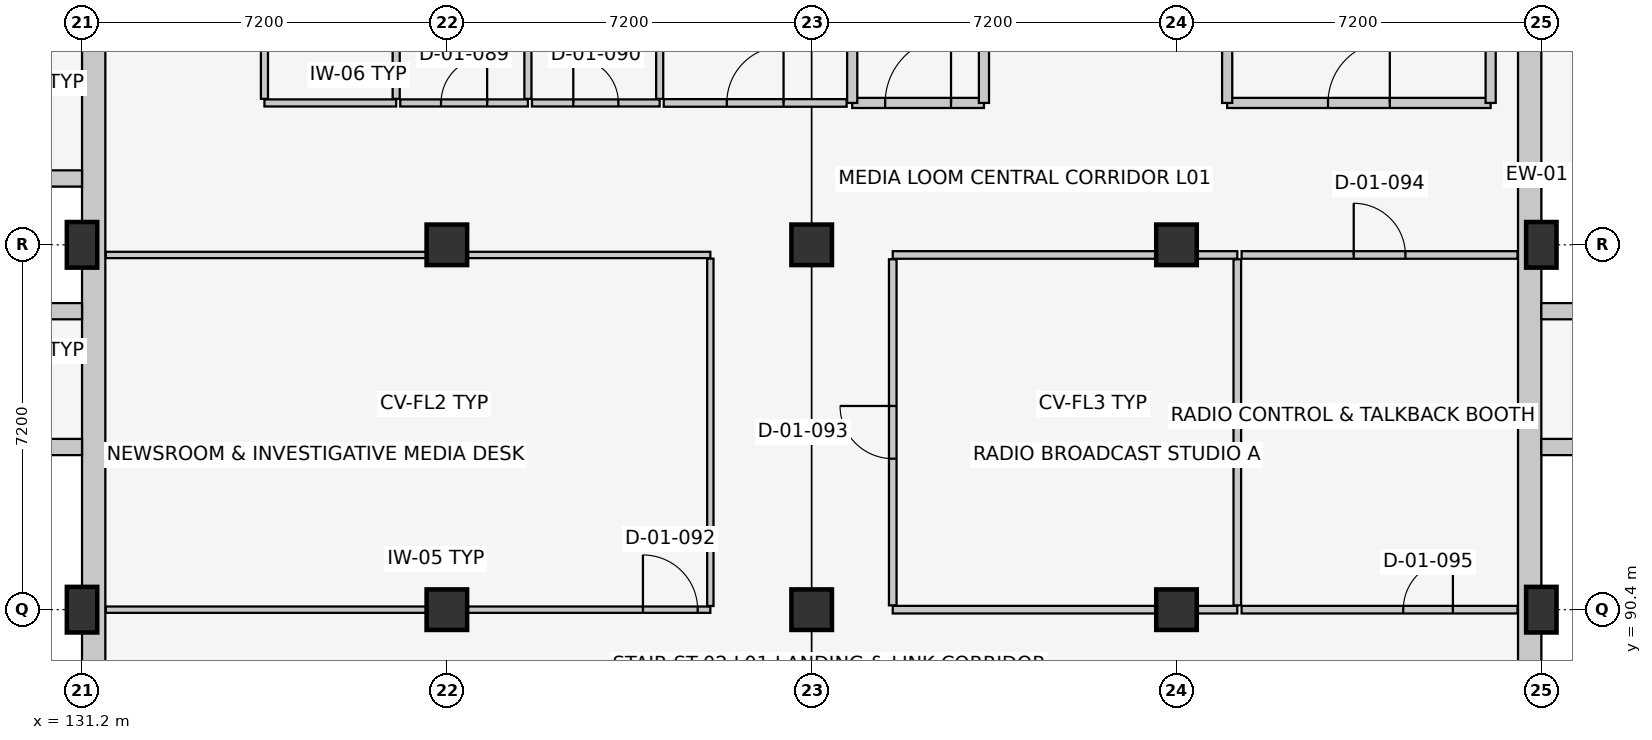
"""IFC4 building model, lengths in metres.
Left out: names, types, materials, properties, quantities, classifications, styles, units other than length and angle.
Written with IfcOpenShell. Run it as: python <this file> out.ifc"""

import sys

from ifc_helpers import new_model, si_unit, direction, frame, frame_2d, origin, origin_2d, place, context, subcontext, project, spatial, rectangle, extrude, element, fill, save


model = new_model("IFC4")
c1 = context("Model", 3, precision=1e-05, world=origin(), true_north=direction((0.0, 1.0)))
c2 = subcontext(c1, "Body", "Model", "MODEL_VIEW")
j1 = project(units=[si_unit("LENGTHUNIT", "METRE"), si_unit("PLANEANGLEUNIT", "RADIAN")], contexts=[c1])
p1 = place(None, origin())
s1 = spatial("IfcSite", under=j1, at=p1, CompositionType="ELEMENT")
p2 = place(p1, origin())
s2 = spatial("IfcBuilding", under=s1, at=p2, CompositionType="ELEMENT")
p3 = place(p2, frame((0.0, 0.0, 5.4)))
s3 = spatial("IfcBuildingStorey", under=s2, at=p3, CompositionType="ELEMENT", Elevation=5.4)
for number, where, z_axis, x_axis in (
    (1, (131.2, 90.4, 0.0), (0.0, 0.0, 1.0), (1.0, 0.0, 0.0)),
    (2, (131.2, 97.6, 0.0), (0.0, 0.0, 1.0), (1.0, 0.0, 0.0)),
):
    element("IfcColumn", number, at=place(p3, frame(where, z_axis=z_axis, x_axis=x_axis)), inside=s3, PredefinedType="COLUMN", context=c2, shape_type="SweptSolid", body=[
        extrude(rectangle(XDim=0.6, YDim=0.9, at=origin_2d()), origin(), (0.0, 0.0, 1.0), 4.2),
    ])
for number, where, z_axis, x_axis in (
    (3, (138.4, 90.4, 0.0), (0.0, 0.0, 1.0), (1.0, 0.0, 0.0)),
    (4, (138.4, 97.6, 0.0), (0.0, 0.0, 1.0), (1.0, 0.0, 0.0)),
    (5, (145.6, 90.4, 0.0), (0.0, 0.0, 1.0), (1.0, 0.0, 0.0)),
    (6, (145.6, 97.6, 0.0), (0.0, 0.0, 1.0), (1.0, 0.0, 0.0)),
    (7, (152.8, 90.4, 0.0), (0.0, 0.0, 1.0), (1.0, 0.0, 0.0)),
    (8, (152.8, 97.6, 0.0), (0.0, 0.0, 1.0), (1.0, 0.0, 0.0)),
):
    element("IfcColumn", number, at=place(p3, frame(where, z_axis=z_axis, x_axis=x_axis)), inside=s3, PredefinedType="COLUMN", context=c2, shape_type="SweptSolid", body=[
        extrude(rectangle(XDim=0.8, YDim=0.8, at=origin_2d()), origin(), (0.0, 0.0, 1.0), 4.2),
    ])
for number, where, z_axis, x_axis in (
    (9, (160.0, 90.4, 0.0), (0.0, 0.0, 1.0), (1.0, 0.0, 0.0)),
    (10, (160.0, 97.6, 0.0), (0.0, 0.0, 1.0), (1.0, 0.0, 0.0)),
):
    element("IfcColumn", number, at=place(p3, frame(where, z_axis=z_axis, x_axis=x_axis)), inside=s3, PredefinedType="COLUMN", context=c2, shape_type="SweptSolid", body=[
        extrude(rectangle(XDim=0.6, YDim=0.9, at=origin_2d()), origin(), (0.0, 0.0, 1.0), 4.2),
    ])
p4 = place(p3, frame((159.77, 112.0, 0.0), z_axis=(0.0, 0.0, 1.0), x_axis=(0.0, -1.0, 0.0)))
e11 = element("IfcWall", 11, at=p4, inside=s3, PredefinedType="SOLIDWALL", context=c2, shape_type="SweptSolid", body=[
    extrude(rectangle(XDim=28.8, YDim=0.46, at=frame_2d((14.4, 0.0))), origin(), (0.0, 0.0, 1.0), 3.205),
])
p5 = place(p3, frame((160.0, 93.61, 0.0), z_axis=(0.0, 0.0, 1.0), x_axis=(1.0, 0.0, 0.0)))
e12 = element("IfcWall", 12, at=p5, inside=s3, PredefinedType="SOLIDWALL", context=c2, shape_type="SweptSolid", body=[
    extrude(rectangle(XDim=1.793, YDim=0.32, at=frame_2d((0.896, 0.0))), origin(), (0.0, 0.0, 1.0), 3.93),
])
for number, where, z_axis, x_axis in (
    (13, (160.0, 96.29, 0.0), (0.0, 0.0, 1.0), (1.0, 0.0, 0.0)),
    (14, (160.0, 98.91, 0.0), (0.0, 0.0, 1.0), (1.0, 0.0, 0.0)),
):
    element("IfcWall", number, at=place(p3, frame(where, z_axis=z_axis, x_axis=x_axis)), inside=s3, PredefinedType="SOLIDWALL", context=c2, shape_type="SweptSolid", body=[
        extrude(rectangle(XDim=1.35, YDim=0.32, at=frame_2d((0.675, 0.0))), origin(), (0.0, 0.0, 1.0), 3.93),
    ])
p6 = place(p3, frame((131.43, 83.2, 0.0), z_axis=(0.0, 0.0, 1.0), x_axis=(0.0, 1.0, 0.0)))
e15 = element("IfcWall", 15, at=p6, inside=s3, PredefinedType="SOLIDWALL", context=c2, shape_type="SweptSolid", body=[
    extrude(rectangle(XDim=28.8, YDim=0.46, at=frame_2d((14.4, 0.0))), origin(), (0.0, 0.0, 1.0), 3.205),
])
p7 = place(p3, frame((131.2, 93.61, 0.0), z_axis=(0.0, 0.0, 1.0), x_axis=(-1.0, 0.0, 0.0)))
e16 = element("IfcWall", 16, at=p7, inside=s3, PredefinedType="SOLIDWALL", context=c2, shape_type="SweptSolid", body=[
    extrude(rectangle(XDim=1.35, YDim=0.32, at=frame_2d((0.675, 0.0))), origin(), (0.0, 0.0, 1.0), 3.93),
])
for number, where, z_axis, x_axis in (
    (17, (131.2, 96.29, 0.0), (0.0, 0.0, 1.0), (-1.0, 0.0, 0.0)),
    (18, (131.2, 98.91, 0.0), (0.0, 0.0, 1.0), (-1.0, 0.0, 0.0)),
):
    element("IfcWall", number, at=place(p3, frame(where, z_axis=z_axis, x_axis=x_axis)), inside=s3, PredefinedType="SOLIDWALL", context=c2, shape_type="SweptSolid", body=[
        extrude(rectangle(XDim=1.793, YDim=0.32, at=frame_2d((0.896, 0.0))), origin(), (0.0, 0.0, 1.0), 3.93),
    ])
p8 = place(p3, frame((146.4, 100.4, 0.0), z_axis=(0.0, 0.0, 1.0), x_axis=(1.0, 0.0, 0.0)))
e19 = element("IfcWall", 19, at=p8, inside=s3, PredefinedType="PARTITIONING", context=c2, shape_type="SweptSolid", body=[
    extrude(rectangle(XDim=2.6, YDim=0.2, at=frame_2d((1.3, 0.0))), origin(), (0.0, 0.0, 1.0), 3.95),
])
p9 = place(p8, frame((0.65, 0.0, 0.0)))
e20 = element("IfcOpeningElement", 20, at=p9, cuts=e19, PredefinedType="OPENING", context=c2, shape_type="SweptSolid", body=[
    extrude(rectangle(XDim=1.3, YDim=2.2, at=frame_2d((0.65, 1.1))), frame((0.0, 0.112, 0.0), z_axis=(0.0, -1.0, 0.0), x_axis=(1.0, 0.0, 0.0)), (0.0, 0.0, 1.0), 0.224),
])
p10 = place(p3, frame((146.4, 106.2, 0.0), z_axis=(0.0, 0.0, 1.0), x_axis=(0.0, -1.0, 0.0)))
e21 = element("IfcWall", 21, at=p10, inside=s3, PredefinedType="PARTITIONING", context=c2, shape_type="SweptSolid", body=[
    extrude(rectangle(XDim=5.8, YDim=0.2, at=frame_2d((2.9, 0.0))), origin(), (0.0, 0.0, 1.0), 3.95),
])
p11 = place(p3, frame((149.0, 100.4, 0.0), z_axis=(0.0, 0.0, 1.0), x_axis=(0.0, 1.0, 0.0)))
e22 = element("IfcWall", 22, at=p11, inside=s3, PredefinedType="PARTITIONING", context=c2, shape_type="SweptSolid", body=[
    extrude(rectangle(XDim=5.8, YDim=0.2, at=frame_2d((2.9, 0.0))), origin(), (0.0, 0.0, 1.0), 3.375),
])
p12 = place(p3, frame((153.8, 100.4, 0.0), z_axis=(0.0, 0.0, 1.0), x_axis=(1.0, 0.0, 0.0)))
e23 = element("IfcWall", 23, at=p12, inside=s3, PredefinedType="PARTITIONING", context=c2, shape_type="SweptSolid", body=[
    extrude(rectangle(XDim=5.2, YDim=0.2, at=frame_2d((2.6, 0.0))), origin(), (0.0, 0.0, 1.0), 3.95),
])
p13 = place(p12, frame((1.99, 0.0, 0.0)))
e24 = element("IfcOpeningElement", 24, at=p13, cuts=e23, PredefinedType="OPENING", context=c2, shape_type="SweptSolid", body=[
    extrude(rectangle(XDim=1.22, YDim=2.2, at=frame_2d((0.61, 1.1))), frame((0.0, 0.112, 0.0), z_axis=(0.0, -1.0, 0.0), x_axis=(1.0, 0.0, 0.0)), (0.0, 0.0, 1.0), 0.224),
])
for number, where, z_axis, x_axis in (
    (25, (153.8, 106.2, 0.0), (0.0, 0.0, 1.0), (0.0, -1.0, 0.0)),
    (26, (159.0, 100.4, 0.0), (0.0, 0.0, 1.0), (0.0, 1.0, 0.0)),
):
    element("IfcWall", number, at=place(p3, frame(where, z_axis=z_axis, x_axis=x_axis)), inside=s3, PredefinedType="PARTITIONING", context=c2, shape_type="SweptSolid", body=[
        extrude(rectangle(XDim=5.8, YDim=0.2, at=frame_2d((2.9, 0.0))), origin(), (0.0, 0.0, 1.0), 3.95),
    ])
p14 = place(p3, frame((134.8, 100.4, 0.0), z_axis=(0.0, 0.0, 1.0), x_axis=(1.0, 0.0, 0.0)))
e27 = element("IfcWall", 27, at=p14, inside=s3, PredefinedType="PARTITIONING", context=c2, shape_type="SweptSolid", body=[
    extrude(rectangle(XDim=2.6, YDim=0.14, at=frame_2d((1.3, 0.0))), origin(), (0.0, 0.0, 1.0), 3.95),
])
p15 = place(p3, frame((134.8, 100.48, 0.0), z_axis=(0.0, 0.0, 1.0), x_axis=(0.0, 1.0, 0.0)))
e28 = element("IfcWall", 28, at=p15, inside=s3, PredefinedType="PARTITIONING", context=c2, shape_type="SweptSolid", body=[
    extrude(rectangle(XDim=4.86, YDim=0.14, at=frame_2d((2.43, 0.0))), origin(), (0.0, 0.0, 1.0), 3.595),
])
p16 = place(p15, frame((1.93, 0.0, 0.0)))
e29 = element("IfcOpeningElement", 29, at=p16, cuts=e28, PredefinedType="OPENING", context=c2, shape_type="SweptSolid", body=[
    extrude(rectangle(XDim=1.0, YDim=2.1, at=frame_2d((0.5, 1.05))), frame((0.0, 0.082, 0.0), z_axis=(0.0, -1.0, 0.0), x_axis=(1.0, 0.0, 0.0)), (0.0, 0.0, 1.0), 0.164),
])
p17 = place(p3, frame((137.4, 100.48, 0.0), z_axis=(0.0, 0.0, 1.0), x_axis=(0.0, 1.0, 0.0)))
e30 = element("IfcWall", 30, at=p17, inside=s3, PredefinedType="PARTITIONING", context=c2, shape_type="SweptSolid", body=[
    extrude(rectangle(XDim=4.86, YDim=0.14, at=frame_2d((2.43, 0.0))), origin(), (0.0, 0.0, 1.0), 3.95),
])
p18 = place(p3, frame((137.48, 100.4, 0.0), z_axis=(0.0, 0.0, 1.0), x_axis=(1.0, 0.0, 0.0)))
e31 = element("IfcWall", 31, at=p18, inside=s3, PredefinedType="PARTITIONING", context=c2, shape_type="SweptSolid", body=[
    extrude(rectangle(XDim=2.52, YDim=0.14, at=frame_2d((1.26, 0.0))), origin(), (0.0, 0.0, 1.0), 3.95),
])
p19 = place(p18, frame((0.805, 0.0, 0.0)))
e32 = element("IfcOpeningElement", 32, at=p19, cuts=e31, PredefinedType="OPENING", context=c2, shape_type="SweptSolid", body=[
    extrude(rectangle(XDim=0.91, YDim=2.06, at=frame_2d((0.455, 1.03))), frame((0.0, 0.082, 0.0), z_axis=(0.0, -1.0, 0.0), x_axis=(1.0, 0.0, 0.0)), (0.0, 0.0, 1.0), 0.164),
])
p20 = place(p3, frame((140.0, 100.48, 0.0), z_axis=(0.0, 0.0, 1.0), x_axis=(0.0, 1.0, 0.0)))
e33 = element("IfcWall", 33, at=p20, inside=s3, PredefinedType="PARTITIONING", context=c2, shape_type="SweptSolid", body=[
    extrude(rectangle(XDim=4.86, YDim=0.14, at=frame_2d((2.43, 0.0))), origin(), (0.0, 0.0, 1.0), 3.95),
])
p21 = place(p3, frame((140.08, 100.4, 0.0), z_axis=(0.0, 0.0, 1.0), x_axis=(1.0, 0.0, 0.0)))
e34 = element("IfcWall", 34, at=p21, inside=s3, PredefinedType="PARTITIONING", context=c2, shape_type="SweptSolid", body=[
    extrude(rectangle(XDim=2.52, YDim=0.14, at=frame_2d((1.26, 0.0))), origin(), (0.0, 0.0, 1.0), 3.95),
])
p22 = place(p21, frame((0.815, 0.0, 0.0)))
e35 = element("IfcOpeningElement", 35, at=p22, cuts=e34, PredefinedType="OPENING", context=c2, shape_type="SweptSolid", body=[
    extrude(rectangle(XDim=0.89, YDim=2.05, at=frame_2d((0.445, 1.025))), frame((0.0, 0.082, 0.0), z_axis=(0.0, -1.0, 0.0), x_axis=(1.0, 0.0, 0.0)), (0.0, 0.0, 1.0), 0.164),
])
p23 = place(p3, frame((142.6, 100.48, 0.0), z_axis=(0.0, 0.0, 1.0), x_axis=(0.0, 1.0, 0.0)))
e36 = element("IfcWall", 36, at=p23, inside=s3, PredefinedType="PARTITIONING", context=c2, shape_type="SweptSolid", body=[
    extrude(rectangle(XDim=4.86, YDim=0.14, at=frame_2d((2.43, 0.0))), origin(), (0.0, 0.0, 1.0), 3.95),
])
p24 = place(p3, frame((142.68, 100.4, 0.0), z_axis=(0.0, 0.0, 1.0), x_axis=(1.0, 0.0, 0.0)))
e37 = element("IfcWall", 37, at=p24, inside=s3, PredefinedType="PARTITIONING", context=c2, shape_type="SweptSolid", body=[
    extrude(rectangle(XDim=3.61, YDim=0.15, at=frame_2d((1.805, 0.0))), origin(), (0.0, 0.0, 1.0), 3.95),
])
p25 = place(p24, frame((1.245, 0.0, 0.0)))
e38 = element("IfcOpeningElement", 38, at=p25, cuts=e37, PredefinedType="OPENING", context=c2, shape_type="SweptSolid", body=[
    extrude(rectangle(XDim=1.12, YDim=2.15, at=frame_2d((0.56, 1.075))), frame((0.0, 0.087, 0.0), z_axis=(0.0, -1.0, 0.0), x_axis=(1.0, 0.0, 0.0)), (0.0, 0.0, 1.0), 0.174),
])
p26 = place(p3, frame((131.67, 90.4, 0.0), z_axis=(0.0, 0.0, 1.0), x_axis=(1.0, 0.0, 0.0)))
e39 = element("IfcWall", 39, at=p26, inside=s3, PredefinedType="PARTITIONING", context=c2, shape_type="SweptSolid", body=[
    extrude(rectangle(XDim=11.93, YDim=0.125, at=frame_2d((5.965, 0.0))), origin(), (0.0, 0.0, 1.0), 3.275),
])
p27 = place(p26, frame((10.6, 0.0, 0.0)))
e40 = element("IfcOpeningElement", 40, at=p27, cuts=e39, PredefinedType="OPENING", context=c2, shape_type="SweptSolid", body=[
    extrude(rectangle(XDim=1.08, YDim=2.15, at=frame_2d((0.54, 1.075))), frame((0.0, 0.074, 0.0), z_axis=(0.0, -1.0, 0.0), x_axis=(1.0, 0.0, 0.0)), (0.0, 0.0, 1.0), 0.149),
])
p28 = place(p3, frame((131.67, 97.4, 0.0), z_axis=(0.0, 0.0, 1.0), x_axis=(1.0, 0.0, 0.0)))
e41 = element("IfcWall", 41, at=p28, inside=s3, PredefinedType="PARTITIONING", context=c2, shape_type="SweptSolid", body=[
    extrude(rectangle(XDim=11.93, YDim=0.125, at=frame_2d((5.965, 0.0))), origin(), (0.0, 0.0, 1.0), 3.275),
])
p29 = place(p3, frame((143.6, 90.472, 0.0), z_axis=(0.0, 0.0, 1.0), x_axis=(0.0, 1.0, 0.0)))
e42 = element("IfcWall", 42, at=p29, inside=s3, PredefinedType="PARTITIONING", context=c2, shape_type="SweptSolid", body=[
    extrude(rectangle(XDim=6.855, YDim=0.125, at=frame_2d((3.427, 0.0))), origin(), (0.0, 0.0, 1.0), 3.95),
])
for number, where, z_axis, x_axis in (
    (43, (147.2, 90.4, 0.0), (0.0, 0.0, 1.0), (1.0, 0.0, 0.0)),
    (44, (147.2, 97.4, 0.0), (0.0, 0.0, 1.0), (1.0, 0.0, 0.0)),
):
    element("IfcWall", number, at=place(p3, frame(where, z_axis=z_axis, x_axis=x_axis)), inside=s3, PredefinedType="PARTITIONING", context=c2, shape_type="SweptSolid", body=[
        extrude(rectangle(XDim=6.8, YDim=0.15, at=frame_2d((3.4, 0.0))), origin(), (0.0, 0.0, 1.0), 3.125),
    ])
p30 = place(p3, frame((147.2, 90.485, 0.0), z_axis=(0.0, 0.0, 1.0), x_axis=(0.0, 1.0, 0.0)))
e45 = element("IfcWall", 45, at=p30, inside=s3, PredefinedType="PARTITIONING", context=c2, shape_type="SweptSolid", body=[
    extrude(rectangle(XDim=6.83, YDim=0.15, at=frame_2d((3.415, 0.0))), origin(), (0.0, 0.0, 1.0), 3.95),
])
p31 = place(p30, frame((2.895, 0.0, 0.0)))
e46 = element("IfcOpeningElement", 46, at=p31, cuts=e45, PredefinedType="OPENING", context=c2, shape_type="SweptSolid", body=[
    extrude(rectangle(XDim=1.04, YDim=2.15, at=frame_2d((0.52, 1.075))), frame((0.0, 0.087, 0.0), z_axis=(0.0, -1.0, 0.0), x_axis=(1.0, 0.0, 0.0)), (0.0, 0.0, 1.0), 0.174),
])
p32 = place(p3, frame((154.0, 90.485, 0.0), z_axis=(0.0, 0.0, 1.0), x_axis=(0.0, 1.0, 0.0)))
e47 = element("IfcWall", 47, at=p32, inside=s3, PredefinedType="PARTITIONING", context=c2, shape_type="SweptSolid", body=[
    extrude(rectangle(XDim=6.83, YDim=0.15, at=frame_2d((3.415, 0.0))), origin(), (0.0, 0.0, 1.0), 3.95),
])
p33 = place(p3, frame((154.085, 90.4, 0.0), z_axis=(0.0, 0.0, 1.0), x_axis=(1.0, 0.0, 0.0)))
e48 = element("IfcWall", 48, at=p33, inside=s3, PredefinedType="PARTITIONING", context=c2, shape_type="SweptSolid", body=[
    extrude(rectangle(XDim=5.445, YDim=0.15, at=frame_2d((2.723, 0.0))), origin(), (0.0, 0.0, 1.0), 3.125),
])
p34 = place(p33, frame((3.19, 0.0, 0.0)))
e49 = element("IfcOpeningElement", 49, at=p34, cuts=e48, PredefinedType="OPENING", context=c2, shape_type="SweptSolid", body=[
    extrude(rectangle(XDim=0.98, YDim=2.12, at=frame_2d((0.49, 1.06))), frame((0.0, 0.087, 0.0), z_axis=(0.0, -1.0, 0.0), x_axis=(1.0, 0.0, 0.0)), (0.0, 0.0, 1.0), 0.174),
])
p35 = place(p3, frame((154.085, 97.4, 0.0), z_axis=(0.0, 0.0, 1.0), x_axis=(1.0, 0.0, 0.0)))
e50 = element("IfcWall", 50, at=p35, inside=s3, PredefinedType="PARTITIONING", context=c2, shape_type="SweptSolid", body=[
    extrude(rectangle(XDim=5.445, YDim=0.15, at=frame_2d((2.723, 0.0))), origin(), (0.0, 0.0, 1.0), 3.125),
])
p36 = place(p35, frame((2.212, 0.0, 0.0)))
e51 = element("IfcOpeningElement", 51, at=p36, cuts=e50, PredefinedType="OPENING", context=c2, shape_type="SweptSolid", body=[
    extrude(rectangle(XDim=1.02, YDim=2.12, at=frame_2d((0.51, 1.06))), frame((0.0, 0.087, 0.0), z_axis=(0.0, -1.0, 0.0), x_axis=(1.0, 0.0, 0.0)), (0.0, 0.0, 1.0), 0.174),
])
p37 = place(p9, origin())
e52 = element("IfcDoor", 52, at=p37, inside=s3, OperationType="SINGLE_SWING_RIGHT", PredefinedType="DOOR", context=c2, shape_type="SweptSolid", body=[
    extrude(rectangle(XDim=1.3, YDim=2.2, at=frame_2d((0.65, 1.1))), frame((0.0, 0.025, 0.0), z_axis=(0.0, -1.0, 0.0), x_axis=(1.0, 0.0, 0.0)), (0.0, 0.0, 1.0), 0.05),
])
fill(e20, e52)
p38 = place(p13, origin())
e53 = element("IfcDoor", 53, at=p38, inside=s3, OperationType="SINGLE_SWING_RIGHT", PredefinedType="DOOR", context=c2, shape_type="SweptSolid", body=[
    extrude(rectangle(XDim=1.22, YDim=2.2, at=frame_2d((0.61, 1.1))), frame((0.0, 0.025, 0.0), z_axis=(0.0, -1.0, 0.0), x_axis=(1.0, 0.0, 0.0)), (0.0, 0.0, 1.0), 0.05),
])
fill(e24, e53)
p39 = place(p19, origin())
e54 = element("IfcDoor", 54, at=p39, inside=s3, OperationType="SINGLE_SWING_RIGHT", PredefinedType="DOOR", context=c2, shape_type="SweptSolid", body=[
    extrude(rectangle(XDim=0.91, YDim=2.06, at=frame_2d((0.455, 1.03))), frame((0.0, 0.025, 0.0), z_axis=(0.0, -1.0, 0.0), x_axis=(1.0, 0.0, 0.0)), (0.0, 0.0, 1.0), 0.05),
])
fill(e32, e54)
p40 = place(p22, origin())
e55 = element("IfcDoor", 55, at=p40, inside=s3, OperationType="SINGLE_SWING_LEFT", PredefinedType="DOOR", context=c2, shape_type="SweptSolid", body=[
    extrude(rectangle(XDim=0.89, YDim=2.05, at=frame_2d((0.445, 1.025))), frame((0.0, 0.025, 0.0), z_axis=(0.0, -1.0, 0.0), x_axis=(1.0, 0.0, 0.0)), (0.0, 0.0, 1.0), 0.05),
])
fill(e35, e55)
p41 = place(p25, origin())
e56 = element("IfcDoor", 56, at=p41, inside=s3, OperationType="SINGLE_SWING_RIGHT", PredefinedType="DOOR", context=c2, shape_type="SweptSolid", body=[
    extrude(rectangle(XDim=1.12, YDim=2.15, at=frame_2d((0.56, 1.075))), frame((0.0, 0.025, 0.0), z_axis=(0.0, -1.0, 0.0), x_axis=(1.0, 0.0, 0.0)), (0.0, 0.0, 1.0), 0.05),
])
fill(e38, e56)
p42 = place(p27, origin())
e57 = element("IfcDoor", 57, at=p42, inside=s3, OperationType="SINGLE_SWING_LEFT", PredefinedType="DOOR", context=c2, shape_type="SweptSolid", body=[
    extrude(rectangle(XDim=1.08, YDim=2.15, at=frame_2d((0.54, 1.075))), frame((0.0, 0.025, 0.0), z_axis=(0.0, -1.0, 0.0), x_axis=(1.0, 0.0, 0.0)), (0.0, 0.0, 1.0), 0.05),
])
fill(e40, e57)
p43 = place(p31, origin())
e58 = element("IfcDoor", 58, at=p43, inside=s3, OperationType="SINGLE_SWING_RIGHT", PredefinedType="DOOR", context=c2, shape_type="SweptSolid", body=[
    extrude(rectangle(XDim=1.04, YDim=2.15, at=frame_2d((0.52, 1.075))), frame((0.0, 0.025, 0.0), z_axis=(0.0, -1.0, 0.0), x_axis=(1.0, 0.0, 0.0)), (0.0, 0.0, 1.0), 0.05),
])
fill(e46, e58)
p44 = place(p36, origin())
e59 = element("IfcDoor", 59, at=p44, inside=s3, OperationType="SINGLE_SWING_LEFT", PredefinedType="DOOR", context=c2, shape_type="SweptSolid", body=[
    extrude(rectangle(XDim=1.02, YDim=2.12, at=frame_2d((0.51, 1.06))), frame((0.0, 0.025, 0.0), z_axis=(0.0, -1.0, 0.0), x_axis=(1.0, 0.0, 0.0)), (0.0, 0.0, 1.0), 0.05),
])
fill(e51, e59)
p45 = place(p34, origin())
e60 = element("IfcDoor", 60, at=p45, inside=s3, OperationType="SINGLE_SWING_RIGHT", PredefinedType="DOOR", context=c2, shape_type="SweptSolid", body=[
    extrude(rectangle(XDim=0.98, YDim=2.12, at=frame_2d((0.49, 1.06))), frame((0.0, 0.025, 0.0), z_axis=(0.0, -1.0, 0.0), x_axis=(1.0, 0.0, 0.0)), (0.0, 0.0, 1.0), 0.05),
])
fill(e49, e60)
save(model, sys.argv[1])
